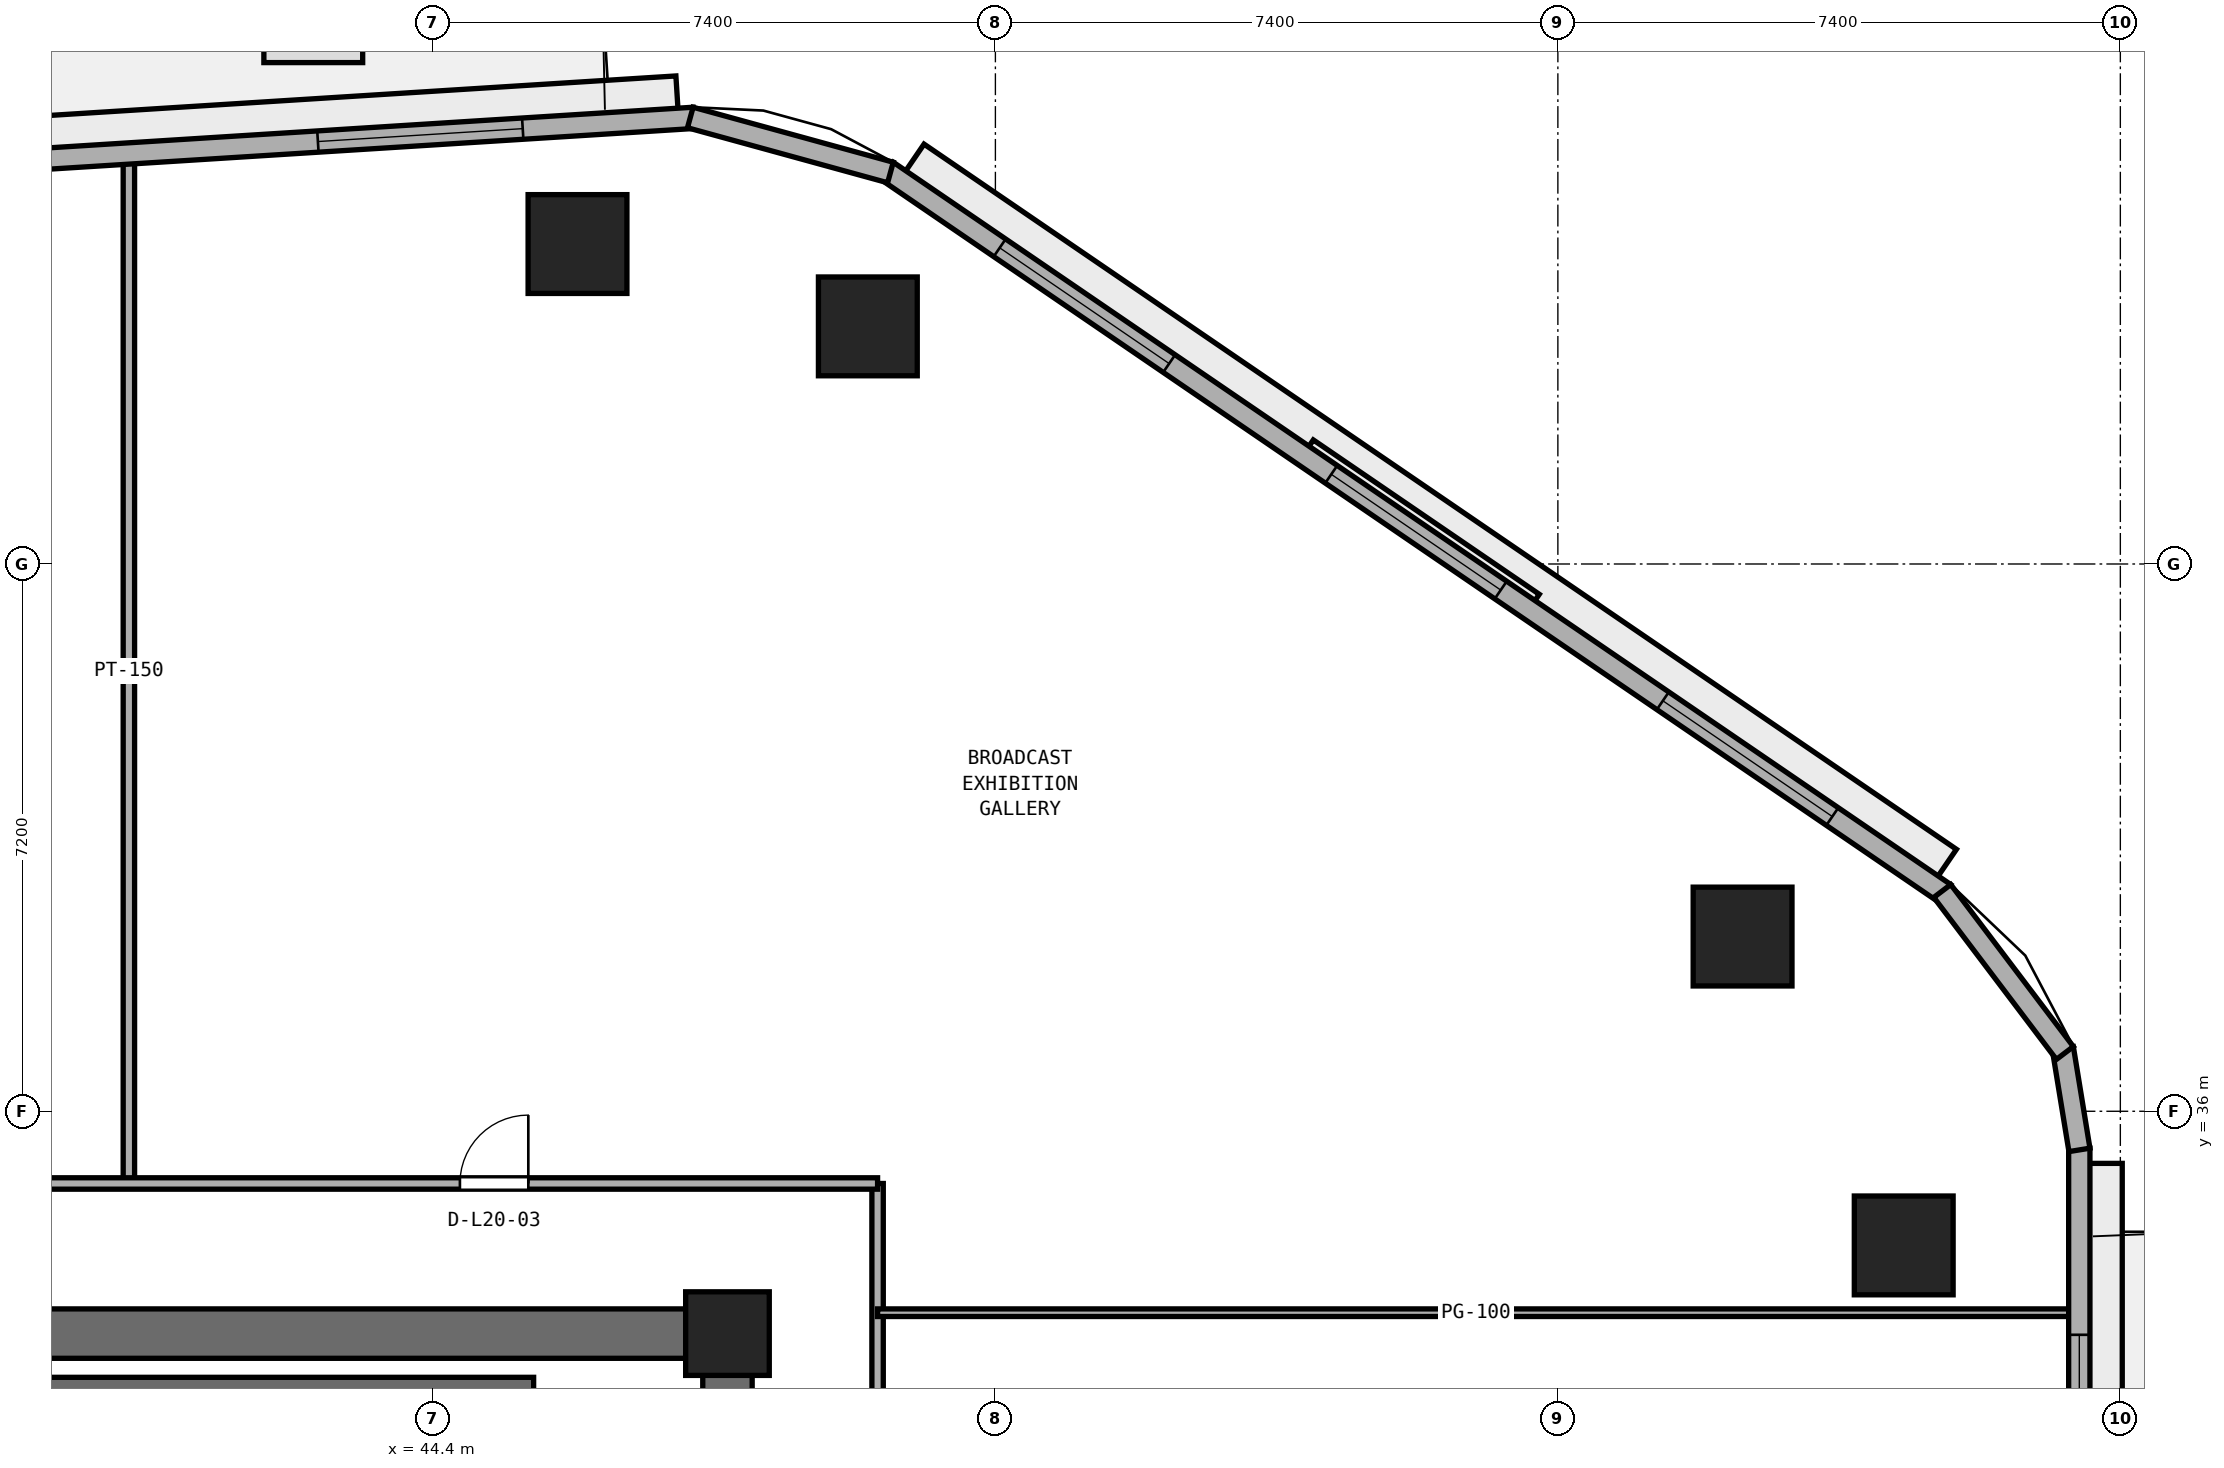
"""IFC4 building model, lengths in metres.
Left out: names, types, materials, properties, quantities, classifications, styles, units other than length and angle.
Written with IfcOpenShell. Run it as: python <this file> out.ifc"""

import sys

from ifc_helpers import new_model, si_unit, direction, frame, frame_2d, origin, origin_2d, place, context, subcontext, project, spatial, rectangle, extrude, element, fill, save


model = new_model("IFC4")
c1 = context("Model", 3, precision=1e-05, world=origin(), true_north=direction((0.0, 1.0)))
c2 = subcontext(c1, "Body", "Model", "MODEL_VIEW")
j1 = project(units=[si_unit("LENGTHUNIT", "METRE"), si_unit("PLANEANGLEUNIT", "RADIAN")], contexts=[c1])
p1 = place(None, origin())
s1 = spatial("IfcSite", under=j1, at=p1, CompositionType="ELEMENT")
p2 = place(p1, origin())
s2 = spatial("IfcBuilding", under=s1, at=p2, CompositionType="ELEMENT")
p3 = place(p2, frame((0.0, 0.0, 82.0)))
s3 = spatial("IfcBuildingStorey", under=s2, at=p3, CompositionType="ELEMENT", Elevation=82.0)
p4 = place(p3, frame((25.4, 33.075, 0.0), z_axis=(0.0, 0.0, 1.0), x_axis=(1.0, 0.0, 0.0)))
e1 = element("IfcWall", 1, at=p4, inside=s3, PredefinedType="SHEAR", context=c2, shape_type="SweptSolid", body=[
    extrude(rectangle(XDim=23.2, YDim=0.65, at=frame_2d((11.6, 0.0))), origin(), (0.0, 0.0, 1.0), 3.525),
])
p5 = place(p3, frame((48.275, 17.65, 0.0), z_axis=(0.0, 0.0, 1.0), x_axis=(0.0, 1.0, 0.0)))
e2 = element("IfcWall", 2, at=p5, inside=s3, PredefinedType="SHEAR", context=c2, shape_type="SweptSolid", body=[
    extrude(rectangle(XDim=15.1, YDim=0.65, at=frame_2d((7.55, 0.0))), origin(), (0.0, 0.0, 1.0), 3.525),
])
p6 = place(p5, frame((5.65, 0.0, 0.0)))
e3 = element("IfcOpeningElement", 3, at=p6, cuts=e2, PredefinedType="OPENING", context=c2, shape_type="SweptSolid", body=[
    extrude(rectangle(XDim=1.5, YDim=2.15, at=frame_2d((0.75, 1.075))), frame((0.0, 0.335, 0.0), z_axis=(0.0, -1.0, 0.0), x_axis=(1.0, 0.0, 0.0)), (0.0, 0.0, 1.0), 0.67),
])
p7 = place(p3, frame((48.275, 33.075, 0.0), z_axis=(0.0, 0.0, 1.0), x_axis=(1.0, 0.0, 0.0)))
e4 = element("IfcColumn", 4, at=p7, inside=s3, PredefinedType="PILASTER", context=c2, shape_type="SweptSolid", body=[
    extrude(rectangle(XDim=1.1, YDim=1.1, at=origin_2d()), origin(), (0.0, 0.0, 1.0), 3.8),
])
for number, where, z_axis, x_axis in (
    (5, (63.75, 34.235, 0.0), (0.0, 0.0, 1.0), (1.0, 0.0, 0.0)),
    (6, (61.63, 38.299, 0.0), (0.0, 0.0, 1.0), (1.0, 0.0, 0.0)),
    (7, (50.122, 46.326, 0.0), (0.0, 0.0, 1.0), (1.0, 0.0, 0.0)),
    (8, (46.302, 47.409, 0.0), (0.0, 0.0, 1.0), (1.0, 0.0, 0.0)),
):
    element("IfcColumn", number, at=place(p3, frame(where, z_axis=z_axis, x_axis=x_axis)), inside=s3, PredefinedType="COLUMN", context=c2, shape_type="SweptSolid", body=[
        extrude(rectangle(XDim=1.3, YDim=1.3, at=origin_2d()), origin(), (0.0, 0.0, 1.0), 3.8),
    ])
p8 = place(p3, frame((38.425, 32.375, 0.0), z_axis=(0.0, 0.0, 1.0), x_axis=(1.0, 0.0, 0.0)))
e9 = element("IfcWall", 9, at=p8, inside=s3, PredefinedType="SHEAR", context=c2, shape_type="SweptSolid", body=[
    extrude(rectangle(XDim=7.3, YDim=0.25, at=frame_2d((3.65, 0.0))), origin(), (0.0, 0.0, 1.0), 3.525),
])
p9 = place(p3, frame((50.25, 15.35, 0.0), z_axis=(0.0, 0.0, 1.0), x_axis=(0.0, 1.0, 0.0)))
e10 = element("IfcWall", 10, at=p9, inside=s3, PredefinedType="PARTITIONING", context=c2, shape_type="SweptSolid", body=[
    extrude(rectangle(XDim=19.7, YDim=0.15, at=frame_2d((9.85, 0.0))), origin(), (0.0, 0.0, 1.0), 3.525),
])
p10 = place(p9, frame((9.4, 0.0, 0.0)))
e11 = element("IfcOpeningElement", 11, at=p10, cuts=e10, PredefinedType="OPENING", context=c2, shape_type="SweptSolid", body=[
    extrude(rectangle(XDim=0.9, YDim=2.1, at=frame_2d((0.45, 1.05))), frame((0.0, 0.085, 0.0), z_axis=(0.0, -1.0, 0.0), x_axis=(1.0, 0.0, 0.0)), (0.0, 0.0, 1.0), 0.17),
])
p11 = place(p3, frame((40.4, 35.05, 0.0), z_axis=(0.0, 0.0, 1.0), x_axis=(0.0, 1.0, 0.0)))
e12 = element("IfcWall", 12, at=p11, inside=s3, PredefinedType="PARTITIONING", context=c2, shape_type="SweptSolid", body=[
    extrude(rectangle(XDim=13.486, YDim=0.15, at=frame_2d((6.743, 0.0))), origin(), (0.0, 0.0, 1.0), 3.525),
])
p12 = place(p3, frame((50.25, 33.35, 0.0), z_axis=(0.0, 0.0, 1.0), x_axis=(1.0, 0.0, 0.0)))
e13 = element("IfcWall", 13, at=p12, inside=s3, PredefinedType="PARTITIONING", context=c2, shape_type="SweptSolid", body=[
    extrude(rectangle(XDim=15.745, YDim=0.1, at=frame_2d((7.873, 0.0))), origin(), (0.0, 0.0, 1.0), 2.908),
])
p13 = place(p3, frame((23.75, 35.05, 0.0), z_axis=(0.0, 0.0, 1.0), x_axis=(1.0, 0.0, 0.0)))
e14 = element("IfcWall", 14, at=p13, inside=s3, PredefinedType="PARTITIONING", context=c2, shape_type="SweptSolid", body=[
    extrude(rectangle(XDim=26.5, YDim=0.15, at=frame_2d((13.25, 0.0))), origin(), (0.0, 0.0, 1.0), 3.525),
])
p14 = place(p13, frame((2.195, 0.0, 0.0)))
e15 = element("IfcOpeningElement", 15, at=p14, cuts=e14, PredefinedType="OPENING", context=c2, shape_type="SweptSolid", body=[
    extrude(rectangle(XDim=1.0, YDim=2.12, at=frame_2d((0.5, 1.06))), frame((0.0, 0.085, 0.0), z_axis=(0.0, -1.0, 0.0), x_axis=(1.0, 0.0, 0.0)), (0.0, 0.0, 1.0), 0.17),
])
p15 = place(p13, frame((10.4, 0.0, 0.0)))
e16 = element("IfcOpeningElement", 16, at=p15, cuts=e14, PredefinedType="OPENING", context=c2, shape_type="SweptSolid", body=[
    extrude(rectangle(XDim=1.0, YDim=2.12, at=frame_2d((0.5, 1.06))), frame((0.0, 0.085, 0.0), z_axis=(0.0, -1.0, 0.0), x_axis=(1.0, 0.0, 0.0)), (0.0, 0.0, 1.0), 0.17),
])
p16 = place(p13, frame((21.005, 0.0, 0.0)))
e17 = element("IfcOpeningElement", 17, at=p16, cuts=e14, PredefinedType="OPENING", context=c2, shape_type="SweptSolid", body=[
    extrude(rectangle(XDim=0.9, YDim=2.1, at=frame_2d((0.45, 1.05))), frame((0.0, 0.085, 0.0), z_axis=(0.0, -1.0, 0.0), x_axis=(1.0, 0.0, 0.0)), (0.0, 0.0, 1.0), 0.17),
])
p17 = place(p3, frame((66.06, 16.183, 0.0), z_axis=(0.0, 0.0, 1.0), x_axis=(0.0, 1.0, 0.0)))
e18 = element("IfcWall", 18, at=p17, inside=s3, PredefinedType="STANDARD", context=c2, shape_type="SweptSolid", body=[
    extrude(rectangle(XDim=19.331, YDim=0.28, at=frame_2d((9.666, 0.0))), origin(), (0.0, 0.0, 1.0), 3.525),
])
p18 = place(p17, frame((9.115, 0.0, 0.0)))
e19 = element("IfcOpeningElement", 19, at=p18, cuts=e18, PredefinedType="OPENING", context=c2, shape_type="SweptSolid", body=[
    extrude(rectangle(XDim=1.1, YDim=2.2, at=frame_2d((0.55, 1.1))), frame((0.0, 0.15, 0.0), z_axis=(0.0, -1.0, 0.0), x_axis=(1.0, 0.0, 0.0)), (0.0, 0.0, 1.0), 0.3),
])
p19 = place(p17, frame((2.205, 0.0, 0.9)))
e20 = element("IfcOpeningElement", 20, at=p19, cuts=e18, PredefinedType="OPENING", context=c2, shape_type="SweptSolid", body=[
    extrude(rectangle(XDim=2.7, YDim=1.75, at=frame_2d((1.35, 0.875))), frame((0.0, 0.15, 0.0), z_axis=(0.0, -1.0, 0.0), x_axis=(1.0, 0.0, 0.0)), (0.0, 0.0, 1.0), 0.3),
])
p20 = place(p17, frame((14.176, 0.0, 0.9)))
e21 = element("IfcOpeningElement", 21, at=p20, cuts=e18, PredefinedType="OPENING", context=c2, shape_type="SweptSolid", body=[
    extrude(rectangle(XDim=2.7, YDim=1.75, at=frame_2d((1.35, 0.875))), frame((0.0, 0.15, 0.0), z_axis=(0.0, -1.0, 0.0), x_axis=(1.0, 0.0, 0.0)), (0.0, 0.0, 1.0), 0.3),
])
p21 = place(p3, frame((64.29, 38.867, 0.0), z_axis=(0.0, 0.0, 1.0), x_axis=(-0.825755550159, 0.564028165416, 0.0)))
e22 = element("IfcWall", 22, at=p21, inside=s3, PredefinedType="STANDARD", context=c2, shape_type="SweptSolid", body=[
    extrude(rectangle(XDim=16.848, YDim=0.28, at=frame_2d((8.424, 0.0))), origin(), (0.0, 0.0, 1.0), 3.525),
])
p22 = place(p21, frame((1.792, 0.0, 0.9)))
e23 = element("IfcOpeningElement", 23, at=p22, cuts=e22, PredefinedType="OPENING", context=c2, shape_type="SweptSolid", body=[
    extrude(rectangle(XDim=2.7, YDim=1.75, at=frame_2d((1.35, 0.875))), frame((0.0, 0.15, 0.0), z_axis=(0.0, -1.0, 0.0), x_axis=(1.0, 0.0, 0.0)), (0.0, 0.0, 1.0), 0.3),
])
p23 = place(p21, frame((7.074, 0.0, 0.9)))
e24 = element("IfcOpeningElement", 24, at=p23, cuts=e22, PredefinedType="OPENING", context=c2, shape_type="SweptSolid", body=[
    extrude(rectangle(XDim=2.7, YDim=1.75, at=frame_2d((1.35, 0.875))), frame((0.0, 0.15, 0.0), z_axis=(0.0, -1.0, 0.0), x_axis=(1.0, 0.0, 0.0)), (0.0, 0.0, 1.0), 0.3),
])
p24 = place(p21, frame((12.357, 0.0, 0.9)))
e25 = element("IfcOpeningElement", 25, at=p24, cuts=e22, PredefinedType="OPENING", context=c2, shape_type="SweptSolid", body=[
    extrude(rectangle(XDim=2.7, YDim=1.75, at=frame_2d((1.35, 0.875))), frame((0.0, 0.15, 0.0), z_axis=(0.0, -1.0, 0.0), x_axis=(1.0, 0.0, 0.0)), (0.0, 0.0, 1.0), 0.3),
])
p25 = place(p3, frame((47.832, 49.069, 0.0), z_axis=(0.0, 0.0, 1.0), x_axis=(-0.998017725054, -0.062933460723, 0.0)))
e26 = element("IfcWall", 26, at=p25, inside=s3, PredefinedType="STANDARD", context=c2, shape_type="SweptSolid", body=[
    extrude(rectangle(XDim=19.629, YDim=0.28, at=frame_2d((9.815, 0.0))), origin(), (0.0, 0.0, 1.0), 3.525),
])
p26 = place(p25, frame((9.265, 0.0, 0.0)))
e27 = element("IfcOpeningElement", 27, at=p26, cuts=e26, PredefinedType="OPENING", context=c2, shape_type="SweptSolid", body=[
    extrude(rectangle(XDim=1.1, YDim=2.2, at=frame_2d((0.55, 1.1))), frame((0.0, 0.15, 0.0), z_axis=(0.0, -1.0, 0.0), x_axis=(1.0, 0.0, 0.0)), (0.0, 0.0, 1.0), 0.3),
])
p27 = place(p25, frame((2.255, 0.0, 0.9)))
e28 = element("IfcOpeningElement", 28, at=p27, cuts=e26, PredefinedType="OPENING", context=c2, shape_type="SweptSolid", body=[
    extrude(rectangle(XDim=2.7, YDim=1.75, at=frame_2d((1.35, 0.875))), frame((0.0, 0.15, 0.0), z_axis=(0.0, -1.0, 0.0), x_axis=(1.0, 0.0, 0.0)), (0.0, 0.0, 1.0), 0.3),
])
p28 = place(p25, frame((14.675, 0.0, 0.9)))
e29 = element("IfcOpeningElement", 29, at=p28, cuts=e26, PredefinedType="OPENING", context=c2, shape_type="SweptSolid", body=[
    extrude(rectangle(XDim=2.7, YDim=1.75, at=frame_2d((1.35, 0.875))), frame((0.0, 0.15, 0.0), z_axis=(0.0, -1.0, 0.0), x_axis=(1.0, 0.0, 0.0)), (0.0, 0.0, 1.0), 0.3),
])
p29 = place(p3, frame((66.062, 35.492, 0.0), z_axis=(0.0, 0.0, 1.0), x_axis=(-0.161182073582, 0.986924687682, 0.0)))
e30 = element("IfcWall", 30, at=p29, inside=s3, PredefinedType="STANDARD", context=c2, shape_type="SweptSolid", body=[
    extrude(rectangle(XDim=1.354, YDim=0.28, at=frame_2d((0.677, 0.0))), origin(), (0.0, 0.0, 1.0), 3.525),
])
p30 = place(p3, frame((65.87, 36.767, 0.0), z_axis=(0.0, 0.0, 1.0), x_axis=(-0.603370463754, 0.797461023166, 0.0)))
e31 = element("IfcWall", 31, at=p30, inside=s3, PredefinedType="STANDARD", context=c2, shape_type="SweptSolid", body=[
    extrude(rectangle(XDim=2.673, YDim=0.28, at=frame_2d((1.336, 0.0))), origin(), (0.0, 0.0, 1.0), 3.525),
])
p31 = place(p3, frame((50.419, 48.351, 0.0), z_axis=(0.0, 0.0, 1.0), x_axis=(-0.964254516967, 0.264977784933, 0.0)))
e32 = element("IfcWall", 32, at=p31, inside=s3, PredefinedType="STANDARD", context=c2, shape_type="SweptSolid", body=[
    extrude(rectangle(XDim=2.731, YDim=0.28, at=frame_2d((1.365, 0.0))), origin(), (0.0, 0.0, 1.0), 3.525),
])
p32 = place(p16, origin())
e33 = element("IfcDoor", 33, at=p32, inside=s3, OperationType="SINGLE_SWING_RIGHT", PredefinedType="DOOR", context=c2, shape_type="SweptSolid", body=[
    extrude(rectangle(XDim=0.9, YDim=2.1, at=frame_2d((0.45, 1.05))), frame((0.0, 0.025, 0.0), z_axis=(0.0, -1.0, 0.0), x_axis=(1.0, 0.0, 0.0)), (0.0, 0.0, 1.0), 0.05),
])
fill(e17, e33)
p33 = place(p20, origin())
e34 = element("IfcWindow", 34, at=p33, inside=s3, PartitioningType="SINGLE_PANEL", PredefinedType="WINDOW", context=c2, shape_type="SweptSolid", body=[
    extrude(rectangle(XDim=2.7, YDim=1.75, at=frame_2d((1.35, 0.875))), frame((0.0, 0.03, 0.0), z_axis=(0.0, -1.0, 0.0), x_axis=(1.0, 0.0, 0.0)), (0.0, 0.0, 1.0), 0.06),
])
fill(e21, e34)
p34 = place(p22, origin())
e35 = element("IfcWindow", 35, at=p34, inside=s3, PartitioningType="SINGLE_PANEL", PredefinedType="WINDOW", context=c2, shape_type="SweptSolid", body=[
    extrude(rectangle(XDim=2.7, YDim=1.75, at=frame_2d((1.35, 0.875))), frame((0.0, 0.03, 0.0), z_axis=(0.0, -1.0, 0.0), x_axis=(1.0, 0.0, 0.0)), (0.0, 0.0, 1.0), 0.06),
])
fill(e23, e35)
p35 = place(p23, origin())
e36 = element("IfcWindow", 36, at=p35, inside=s3, PartitioningType="SINGLE_PANEL", PredefinedType="WINDOW", context=c2, shape_type="SweptSolid", body=[
    extrude(rectangle(XDim=2.7, YDim=1.75, at=frame_2d((1.35, 0.875))), frame((0.0, 0.03, 0.0), z_axis=(0.0, -1.0, 0.0), x_axis=(1.0, 0.0, 0.0)), (0.0, 0.0, 1.0), 0.06),
])
fill(e24, e36)
p36 = place(p24, origin())
e37 = element("IfcWindow", 37, at=p36, inside=s3, PartitioningType="SINGLE_PANEL", PredefinedType="WINDOW", context=c2, shape_type="SweptSolid", body=[
    extrude(rectangle(XDim=2.7, YDim=1.75, at=frame_2d((1.35, 0.875))), frame((0.0, 0.03, 0.0), z_axis=(0.0, -1.0, 0.0), x_axis=(1.0, 0.0, 0.0)), (0.0, 0.0, 1.0), 0.06),
])
fill(e25, e37)
p37 = place(p27, origin())
e38 = element("IfcWindow", 38, at=p37, inside=s3, PartitioningType="SINGLE_PANEL", PredefinedType="WINDOW", context=c2, shape_type="SweptSolid", body=[
    extrude(rectangle(XDim=2.7, YDim=1.75, at=frame_2d((1.35, 0.875))), frame((0.0, 0.03, 0.0), z_axis=(0.0, -1.0, 0.0), x_axis=(1.0, 0.0, 0.0)), (0.0, 0.0, 1.0), 0.06),
])
fill(e28, e38)
save(model, sys.argv[1])
